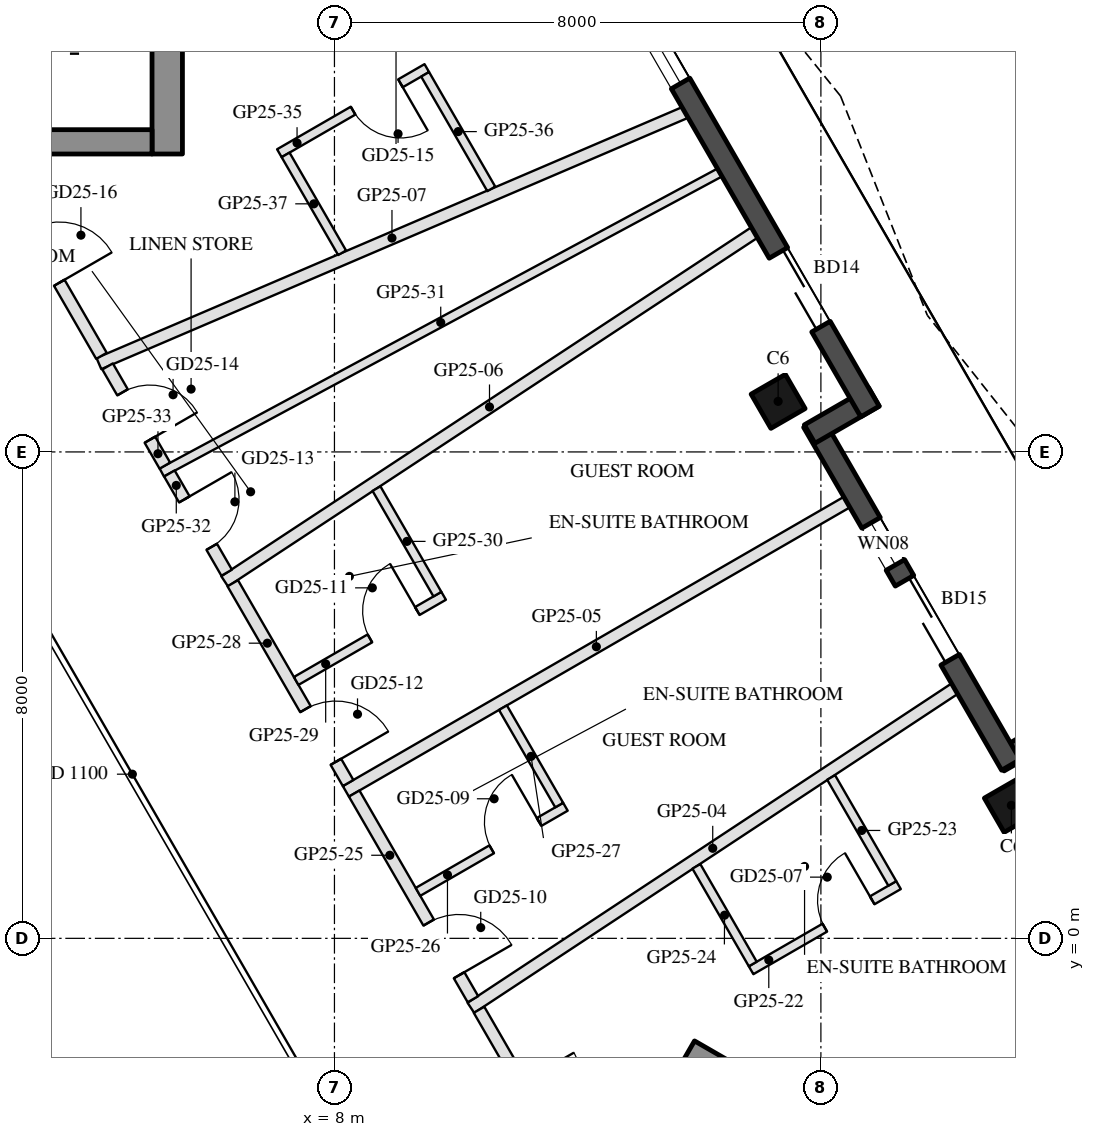
"""IFC4 building model, lengths in metres.
Left out: names, types, materials, properties, quantities, classifications, styles, units other than length and angle.
Written with IfcOpenShell. Run it as: python <this file> out.ifc"""

import sys

from ifc_helpers import new_model, si_unit, direction, frame, frame_2d, origin, origin_2d, place, context, subcontext, project, spatial, rectangle, hollow_rectangle, extrude, boolean, halfspace, element, fill, save


model = new_model("IFC4")
c1 = context("Model", 3, precision=1e-05, world=origin(), true_north=direction((0.0, 1.0)))
c2 = subcontext(c1, "Body", "Model", "MODEL_VIEW")
j1 = project(units=[si_unit("LENGTHUNIT", "METRE"), si_unit("PLANEANGLEUNIT", "RADIAN")], contexts=[c1])
p1 = place(None, origin())
s1 = spatial("IfcSite", under=j1, at=p1, CompositionType="ELEMENT")
p2 = place(p1, origin())
s2 = spatial("IfcBuilding", under=s1, at=p2, CompositionType="ELEMENT")
p3 = place(p2, frame((0.0, 0.0, 257.8)))
s3 = spatial("IfcBuildingStorey", under=s2, at=p3, CompositionType="ELEMENT", Elevation=257.8)
p4 = place(p3, frame((19.132, 2.188, 0.0), z_axis=(0.0, 0.0, 1.0), x_axis=(-0.5, 0.866025403784, 0.0)))
e1 = element("IfcColumn", 1, at=p4, inside=s3, PredefinedType="COLUMN", context=c2, shape_type="SweptSolid", body=[
    boolean("DIFFERENCE", extrude(hollow_rectangle(XDim=0.65, YDim=0.65, WallThickness=0.03, at=origin_2d()), origin(), (0.0, 0.0, 1.0), 3.7), halfspace(frame((0.0, 0.0, 0.04), z_axis=(0.0, 0.0, 1.0), x_axis=(1.0, 0.0, 0.0)), True)),
])
p5 = place(p3, frame((15.296, 8.832, 0.0), z_axis=(0.0, 0.0, 1.0), x_axis=(-0.5, 0.866025403784, 0.0)))
e2 = element("IfcColumn", 2, at=p5, inside=s3, PredefinedType="COLUMN", context=c2, shape_type="SweptSolid", body=[
    boolean("DIFFERENCE", extrude(hollow_rectangle(XDim=0.65, YDim=0.65, WallThickness=0.03, at=origin_2d()), origin(), (0.0, 0.0, 1.0), 3.7), halfspace(frame((0.0, 0.0, 0.037), z_axis=(0.0, 0.0, 1.0), x_axis=(1.0, 0.0, 0.0)), True)),
])
p6 = place(p3, frame((19.982, 3.515, 0.0), z_axis=(0.0, 0.0, 1.0), x_axis=(-0.866092288191, -0.499884134912, 0.0)))
e3 = element("IfcWall", 3, at=p6, inside=s3, PredefinedType="SOLIDWALL", context=c2, shape_type="SweptSolid", body=[
    extrude(rectangle(XDim=1.22, YDim=0.35, at=frame_2d((0.61, 0.0))), origin(), (0.0, 0.0, 1.0), 3.55),
])
p7 = place(p3, frame((19.124, 2.852, 0.0), z_axis=(0.0, 0.0, 1.0), x_axis=(-0.499993986225, 0.866028875811, 0.0)))
e4 = element("IfcWall", 4, at=p7, inside=s3, PredefinedType="SOLIDWALL", context=c2, shape_type="SweptSolid", body=[
    extrude(rectangle(XDim=6.512, YDim=0.35, at=frame_2d((3.256, 0.0))), origin(), (0.0, 0.0, 1.0), 3.55),
])
p8 = place(p7, frame((1.997, 0.0, 0.0)))
e5 = element("IfcOpeningElement", 5, at=p8, cuts=e4, PredefinedType="OPENING", context=c2, shape_type="SweptSolid", body=[
    extrude(rectangle(XDim=1.5, YDim=2.4, at=frame_2d((0.75, 1.2))), frame((0.0, 0.185, 0.0), z_axis=(0.0, -1.0, 0.0), x_axis=(1.0, 0.0, 0.0)), (0.0, 0.0, 1.0), 0.37),
])
p9 = place(p7, frame((3.797, 0.0, 0.3)))
e6 = element("IfcOpeningElement", 6, at=p9, cuts=e4, PredefinedType="OPENING", context=c2, shape_type="SweptSolid", body=[
    extrude(rectangle(XDim=0.8, YDim=2.65, at=frame_2d((0.4, 1.325))), frame((0.0, 0.185, 0.0), z_axis=(0.0, -1.0, 0.0), x_axis=(1.0, 0.0, 0.0)), (0.0, 0.0, 1.0), 0.37),
])
p10 = place(p3, frame((15.815, 8.294, 0.0), z_axis=(0.0, 0.0, 1.0), x_axis=(0.866055662726, 0.499947586314, 0.0)))
e7 = element("IfcWall", 7, at=p10, inside=s3, PredefinedType="SOLIDWALL", context=c2, shape_type="SweptSolid", body=[
    extrude(rectangle(XDim=1.22, YDim=0.35, at=frame_2d((0.61, 0.0))), origin(), (0.0, 0.0, 1.0), 3.55),
])
p11 = place(p3, frame((16.807, 8.665, 0.0), z_axis=(0.0, 0.0, 1.0), x_axis=(-0.499992427901, 0.866029775494, 0.0)))
e8 = element("IfcWall", 8, at=p11, inside=s3, PredefinedType="SOLIDWALL", context=c2, shape_type="SweptSolid", body=[
    extrude(rectangle(XDim=9.472, YDim=0.35, at=frame_2d((4.736, 0.0))), origin(), (0.0, 0.0, 1.0), 3.55),
])
p12 = place(p11, frame((1.612, 0.0, 0.0)))
e9 = element("IfcOpeningElement", 9, at=p12, cuts=e8, PredefinedType="OPENING", context=c2, shape_type="SweptSolid", body=[
    extrude(rectangle(XDim=1.4, YDim=2.4, at=frame_2d((0.7, 1.2))), frame((0.0, 0.185, 0.0), z_axis=(0.0, -1.0, 0.0), x_axis=(1.0, 0.0, 0.0)), (0.0, 0.0, 1.0), 0.37),
])
p13 = place(p11, frame((6.23, 0.0, 0.3)))
e10 = element("IfcOpeningElement", 10, at=p13, cuts=e8, PredefinedType="OPENING", context=c2, shape_type="SweptSolid", body=[
    extrude(rectangle(XDim=1.6, YDim=2.65, at=frame_2d((0.8, 1.325))), frame((0.0, 0.185, 0.0), z_axis=(0.0, -1.0, 0.0), x_axis=(1.0, 0.0, 0.0)), (0.0, 0.0, 1.0), 0.37),
])
p14 = place(p3, frame((5.25, 12.9, 0.0), z_axis=(0.0, 0.0, 1.0), x_axis=(0.0, 1.0, 0.0)))
e11 = element("IfcWall", 11, at=p14, inside=s3, PredefinedType="SHEAR", context=c2, shape_type="SweptSolid", body=[
    extrude(rectangle(XDim=13.934, YDim=0.5, at=frame_2d((6.967, 0.0))), origin(), (0.0, 0.0, 1.0), 3.5),
])
p15 = place(p3, frame((5.0, 13.1, 0.0), z_axis=(0.0, 0.0, 1.0), x_axis=(-1.0, 0.0, 0.0)))
e12 = element("IfcWall", 12, at=p15, inside=s3, PredefinedType="SHEAR", context=c2, shape_type="SweptSolid", body=[
    extrude(rectangle(XDim=10.0, YDim=0.4, at=frame_2d((5.0, 0.0))), origin(), (0.0, 0.0, 1.0), 3.5),
])
p16 = place(p15, frame((3.55, 0.0, 0.0)))
e13 = element("IfcOpeningElement", 13, at=p16, cuts=e12, PredefinedType="OPENING", context=c2, shape_type="SweptSolid", body=[
    extrude(rectangle(XDim=1.1, YDim=2.1, at=frame_2d((0.55, 1.05))), frame((0.0, 0.21, 0.0), z_axis=(0.0, -1.0, 0.0), x_axis=(1.0, 0.0, 0.0)), (0.0, 0.0, 1.0), 0.42),
])
p17 = place(p15, frame((5.85, 0.0, 0.0)))
e14 = element("IfcOpeningElement", 14, at=p17, cuts=e12, PredefinedType="OPENING", context=c2, shape_type="SweptSolid", body=[
    extrude(rectangle(XDim=1.4, YDim=2.1, at=frame_2d((0.7, 1.05))), frame((0.0, 0.21, 0.0), z_axis=(0.0, -1.0, 0.0), x_axis=(1.0, 0.0, 0.0)), (0.0, 0.0, 1.0), 0.42),
])
p18 = place(p3, frame((13.797, -1.903, 0.0), z_axis=(0.0, 0.0, 1.0), x_axis=(0.86602744543, -0.49999646375, 0.0)))
e15 = element("IfcWall", 15, at=p18, inside=s3, PredefinedType="SHEAR", context=c2, shape_type="SweptSolid", body=[
    extrude(rectangle(XDim=13.934, YDim=0.5, at=frame_2d((6.967, 0.0))), origin(), (0.0, 0.0, 1.0), 3.5),
])
p19 = place(p3, frame((18.198, 4.105, 0.0), z_axis=(0.0, 0.0, 1.0), x_axis=(-0.83467370746, -0.550744770356, 0.0)))
e16 = element("IfcWall", 16, at=p19, inside=s3, PredefinedType="PARTITIONING", context=c2, shape_type="SweptSolid", body=[
    extrude(rectangle(XDim=9.53, YDim=0.2, at=frame_2d((4.765, 0.0))), origin(), (0.0, 0.0, 1.0), 3.16),
])
p20 = place(p3, frame((16.427, 7.174, 0.0), z_axis=(0.0, 0.0, 1.0), x_axis=(-0.866033014143, -0.499986818241, 0.0)))
e17 = element("IfcWall", 17, at=p20, inside=s3, PredefinedType="PARTITIONING", context=c2, shape_type="SweptSolid", body=[
    extrude(rectangle(XDim=9.513, YDim=0.2, at=frame_2d((4.756, 0.0))), origin(), (0.0, 0.0, 1.0), 3.16),
])
p21 = place(p3, frame((14.906, 11.608, 0.0), z_axis=(0.0, 0.0, 1.0), x_axis=(-0.835212554653, -0.549927257507, 0.0)))
e18 = element("IfcWall", 18, at=p21, inside=s3, PredefinedType="PARTITIONING", context=c2, shape_type="SweptSolid", body=[
    extrude(rectangle(XDim=10.431, YDim=0.2, at=frame_2d((5.216, 0.0))), origin(), (0.0, 0.0, 1.0), 3.16),
])
p22 = place(p3, frame((13.766, 13.583, 0.0), z_axis=(0.0, 0.0, 1.0), x_axis=(-0.919210042537, -0.393767568115, 0.0)))
e19 = element("IfcWall", 19, at=p22, inside=s3, PredefinedType="PARTITIONING", context=c2, shape_type="SweptSolid", body=[
    extrude(rectangle(XDim=10.487, YDim=0.2, at=frame_2d((5.243, 0.0))), origin(), (0.0, 0.0, 1.0), 3.16),
])
p23 = place(p3, frame((10.378, -1.175, 0.0), z_axis=(0.0, 0.0, 1.0), x_axis=(0.50004096614, -0.86600175068, 0.0)))
e20 = element("IfcWall", 20, at=p23, inside=s3, PredefinedType="PARTITIONING", context=c2, shape_type="SweptSolid", body=[
    extrude(rectangle(XDim=3.782, YDim=0.2, at=frame_2d((1.891, 0.0))), origin(), (0.0, 0.0, 1.0), 3.0),
])
p24 = place(p23, frame((1.391, 0.0, 0.0)))
e21 = element("IfcOpeningElement", 21, at=p24, cuts=e20, PredefinedType="OPENING", context=c2, shape_type="SweptSolid", body=[
    extrude(rectangle(XDim=1.0, YDim=2.1, at=frame_2d((0.5, 1.05))), frame((0.0, 0.11, 0.0), z_axis=(0.0, -1.0, 0.0), x_axis=(1.0, 0.0, 0.0)), (0.0, 0.0, 1.0), 0.22),
])
p25 = place(p3, frame((14.852, -0.524, 0.0), z_axis=(0.0, 0.0, 1.0), x_axis=(0.866034573852, 0.49998411664, 0.0)))
e22 = element("IfcWall", 22, at=p25, inside=s3, PredefinedType="PARTITIONING", context=c2, shape_type="SweptSolid", body=[
    extrude(rectangle(XDim=2.8, YDim=0.15, at=frame_2d((1.4, 0.0))), origin(), (0.0, 0.0, 1.0), 3.55),
])
p26 = place(p25, frame((1.4, 0.0, 0.0)))
e23 = element("IfcOpeningElement", 23, at=p26, cuts=e22, PredefinedType="OPENING", context=c2, shape_type="SweptSolid", body=[
    extrude(rectangle(XDim=0.9, YDim=2.1, at=frame_2d((0.45, 1.05))), frame((0.0, 0.085, 0.0), z_axis=(0.0, -1.0, 0.0), x_axis=(1.0, 0.0, 0.0)), (0.0, 0.0, 1.0), 0.17),
])
p27 = place(p3, frame((17.175, 0.903, 0.0), z_axis=(0.0, 0.0, 1.0), x_axis=(-0.499974444137, 0.866040157966, 0.0)))
e24 = element("IfcWall", 24, at=p27, inside=s3, PredefinedType="PARTITIONING", context=c2, shape_type="SweptSolid", body=[
    extrude(rectangle(XDim=2.013, YDim=0.15, at=frame_2d((1.006, 0.0))), origin(), (0.0, 0.0, 1.0), 3.0),
])
p28 = place(p3, frame((14.879, -0.422, 0.0), z_axis=(0.0, 0.0, 1.0), x_axis=(-0.499920006315, 0.866071583234, 0.0)))
e25 = element("IfcWall", 25, at=p28, inside=s3, PredefinedType="PARTITIONING", context=c2, shape_type="SweptSolid", body=[
    extrude(rectangle(XDim=1.854, YDim=0.15, at=frame_2d((0.927, 0.0))), origin(), (0.0, 0.0, 1.0), 3.0),
])
p29 = place(p3, frame((8.325, 2.381, 0.0), z_axis=(0.0, 0.0, 1.0), x_axis=(0.499991187483, -0.866030491634, 0.0)))
e26 = element("IfcWall", 26, at=p29, inside=s3, PredefinedType="PARTITIONING", context=c2, shape_type="SweptSolid", body=[
    extrude(rectangle(XDim=3.906, YDim=0.2, at=frame_2d((1.953, 0.0))), origin(), (0.0, 0.0, 1.0), 3.0),
])
p30 = place(p29, frame((2.45, 0.0, 0.0)))
e27 = element("IfcOpeningElement", 27, at=p30, cuts=e26, PredefinedType="OPENING", context=c2, shape_type="SweptSolid", body=[
    extrude(rectangle(XDim=1.0, YDim=2.1, at=frame_2d((0.5, 1.05))), frame((0.0, 0.11, 0.0), z_axis=(0.0, -1.0, 0.0), x_axis=(1.0, 0.0, 0.0)), (0.0, 0.0, 1.0), 0.22),
])
p31 = place(p3, frame((9.374, 0.764, 0.0), z_axis=(0.0, 0.0, 1.0), x_axis=(0.865996816683, 0.500049511043, 0.0)))
e28 = element("IfcWall", 28, at=p31, inside=s3, PredefinedType="PARTITIONING", context=c2, shape_type="SweptSolid", body=[
    extrude(rectangle(XDim=2.8, YDim=0.15, at=frame_2d((1.4, 0.0))), origin(), (0.0, 0.0, 1.0), 3.55),
])
p32 = place(p31, frame((1.4, 0.0, 0.0)))
e29 = element("IfcOpeningElement", 29, at=p32, cuts=e28, PredefinedType="OPENING", context=c2, shape_type="SweptSolid", body=[
    extrude(rectangle(XDim=0.9, YDim=2.1, at=frame_2d((0.45, 1.05))), frame((0.0, 0.085, 0.0), z_axis=(0.0, -1.0, 0.0), x_axis=(1.0, 0.0, 0.0)), (0.0, 0.0, 1.0), 0.17),
])
p33 = place(p3, frame((11.696, 2.192, 0.0), z_axis=(0.0, 0.0, 1.0), x_axis=(-0.500042316284, 0.866000971088, 0.0)))
e30 = element("IfcWall", 30, at=p33, inside=s3, PredefinedType="PARTITIONING", context=c2, shape_type="SweptSolid", body=[
    extrude(rectangle(XDim=1.85, YDim=0.15, at=frame_2d((0.925, 0.0))), origin(), (0.0, 0.0, 1.0), 3.0),
])
p34 = place(p3, frame((6.328, 5.84, 0.0), z_axis=(0.0, 0.0, 1.0), x_axis=(0.50002883476, -0.866008755388, 0.0)))
e31 = element("IfcWall", 31, at=p34, inside=s3, PredefinedType="PARTITIONING", context=c2, shape_type="SweptSolid", body=[
    extrude(rectangle(XDim=3.794, YDim=0.2, at=frame_2d((1.897, 0.0))), origin(), (0.0, 0.0, 1.0), 3.0),
])
p35 = place(p34, frame((2.391, 0.0, 0.0)))
e32 = element("IfcOpeningElement", 32, at=p35, cuts=e31, PredefinedType="OPENING", context=c2, shape_type="SweptSolid", body=[
    extrude(rectangle(XDim=1.0, YDim=2.1, at=frame_2d((0.5, 1.05))), frame((0.0, 0.11, 0.0), z_axis=(0.0, -1.0, 0.0), x_axis=(1.0, 0.0, 0.0)), (0.0, 0.0, 1.0), 0.22),
])
p36 = place(p3, frame((7.371, 4.233, 0.0), z_axis=(0.0, 0.0, 1.0), x_axis=(0.866034573852, 0.49998411664, 0.0)))
e33 = element("IfcWall", 33, at=p36, inside=s3, PredefinedType="PARTITIONING", context=c2, shape_type="SweptSolid", body=[
    extrude(rectangle(XDim=2.8, YDim=0.15, at=frame_2d((1.4, 0.0))), origin(), (0.0, 0.0, 1.0), 3.0),
])
p37 = place(p36, frame((1.4, 0.0, 0.0)))
e34 = element("IfcOpeningElement", 34, at=p37, cuts=e33, PredefinedType="OPENING", context=c2, shape_type="SweptSolid", body=[
    extrude(rectangle(XDim=0.9, YDim=2.1, at=frame_2d((0.45, 1.05))), frame((0.0, 0.085, 0.0), z_axis=(0.0, -1.0, 0.0), x_axis=(1.0, 0.0, 0.0)), (0.0, 0.0, 1.0), 0.17),
])
p38 = place(p3, frame((9.693, 5.661, 0.0), z_axis=(0.0, 0.0, 1.0), x_axis=(-0.499964999879, 0.866045610171, 0.0)))
e35 = element("IfcWall", 35, at=p38, inside=s3, PredefinedType="PARTITIONING", context=c2, shape_type="SweptSolid", body=[
    extrude(rectangle(XDim=2.004, YDim=0.15, at=frame_2d((1.002, 0.0))), origin(), (0.0, 0.0, 1.0), 3.0),
])
p39 = place(p3, frame((14.336, 12.595, 0.0), z_axis=(0.0, 0.0, 1.0), x_axis=(-0.880794466183, -0.473498794445, 0.0)))
e36 = element("IfcWall", 36, at=p39, inside=s3, PredefinedType="PARTITIONING", context=c2, shape_type="SweptSolid", body=[
    extrude(rectangle(XDim=10.418, YDim=0.15, at=frame_2d((5.209, 0.0))), origin(), (0.0, 0.0, 1.0), 3.0),
])
p40 = place(p3, frame((5.286, 7.645, 0.0), z_axis=(0.0, 0.0, 1.0), x_axis=(0.500014143148, -0.86601723808, 0.0)))
e37 = element("IfcWall", 37, at=p40, inside=s3, PredefinedType="PARTITIONING", context=c2, shape_type="SweptSolid", body=[
    extrude(rectangle(XDim=1.884, YDim=0.2, at=frame_2d((0.942, 0.0))), origin(), (0.0, 0.0, 1.0), 3.0),
])
p41 = place(p40, frame((0.492, 0.0, 0.0)))
e38 = element("IfcOpeningElement", 38, at=p41, cuts=e37, PredefinedType="OPENING", context=c2, shape_type="SweptSolid", body=[
    extrude(rectangle(XDim=0.9, YDim=2.1, at=frame_2d((0.45, 1.05))), frame((0.0, 0.11, 0.0), z_axis=(0.0, -1.0, 0.0), x_axis=(1.0, 0.0, 0.0)), (0.0, 0.0, 1.0), 0.22),
])
p42 = place(p3, frame((4.269, 9.406, 0.0), z_axis=(0.0, 0.0, 1.0), x_axis=(0.499973055223, -0.8660409598, 0.0)))
e39 = element("IfcWall", 39, at=p42, inside=s3, PredefinedType="PARTITIONING", context=c2, shape_type="SweptSolid", body=[
    extrude(rectangle(XDim=1.883, YDim=0.2, at=frame_2d((0.942, 0.0))), origin(), (0.0, 0.0, 1.0), 3.55),
])
p43 = place(p42, frame((0.492, 0.0, 0.0)))
e40 = element("IfcOpeningElement", 40, at=p43, cuts=e39, PredefinedType="OPENING", context=c2, shape_type="SweptSolid", body=[
    extrude(rectangle(XDim=0.9, YDim=2.1, at=frame_2d((0.45, 1.05))), frame((0.0, 0.11, 0.0), z_axis=(0.0, -1.0, 0.0), x_axis=(1.0, 0.0, 0.0)), (0.0, 0.0, 1.0), 0.22),
])
p44 = place(p3, frame((2.281, 12.85, 0.0), z_axis=(0.0, 0.0, 1.0), x_axis=(0.499978071388, -0.866038063904, 0.0)))
e41 = element("IfcWall", 41, at=p44, inside=s3, PredefinedType="PARTITIONING", context=c2, shape_type="SweptSolid", body=[
    extrude(rectangle(XDim=3.776, YDim=0.2, at=frame_2d((1.888, 0.0))), origin(), (0.0, 0.0, 1.0), 3.0),
])
p45 = place(p44, frame((1.388, 0.0, 0.0)))
e42 = element("IfcOpeningElement", 42, at=p45, cuts=e41, PredefinedType="OPENING", context=c2, shape_type="SweptSolid", body=[
    extrude(rectangle(XDim=1.0, YDim=2.1, at=frame_2d((0.5, 1.05))), frame((0.0, 0.11, 0.0), z_axis=(0.0, -1.0, 0.0), x_axis=(1.0, 0.0, 0.0)), (0.0, 0.0, 1.0), 0.22),
])
p46 = place(p3, frame((9.519, 14.313, 0.0), z_axis=(0.0, 0.0, 1.0), x_axis=(-0.865996816683, -0.500049511043, 0.0)))
e43 = element("IfcWall", 43, at=p46, inside=s3, PredefinedType="PARTITIONING", context=c2, shape_type="SweptSolid", body=[
    extrude(rectangle(XDim=2.8, YDim=0.15, at=frame_2d((1.4, 0.0))), origin(), (0.0, 0.0, 1.0), 3.0),
])
p47 = place(p46, frame((0.5, 0.0, 0.0)))
e44 = element("IfcOpeningElement", 44, at=p47, cuts=e43, PredefinedType="OPENING", context=c2, shape_type="SweptSolid", body=[
    extrude(rectangle(XDim=0.9, YDim=2.1, at=frame_2d((0.45, 1.05))), frame((0.0, 0.085, 0.0), z_axis=(0.0, -1.0, 0.0), x_axis=(1.0, 0.0, 0.0)), (0.0, 0.0, 1.0), 0.17),
])
p48 = place(p3, frame((10.579, 12.326, 0.0), z_axis=(0.0, 0.0, 1.0), x_axis=(-0.499965319569, 0.866045425615, 0.0)))
e45 = element("IfcWall", 45, at=p48, inside=s3, PredefinedType="PARTITIONING", context=c2, shape_type="SweptSolid", body=[
    extrude(rectangle(XDim=2.176, YDim=0.15, at=frame_2d((1.088, 0.0))), origin(), (0.0, 0.0, 1.0), 3.55),
])
p49 = place(p3, frame((8.126, 11.276, 0.0), z_axis=(0.0, 0.0, 1.0), x_axis=(-0.500093796661, 0.865971243484, 0.0)))
e46 = element("IfcWall", 46, at=p49, inside=s3, PredefinedType="PARTITIONING", context=c2, shape_type="SweptSolid", body=[
    extrude(rectangle(XDim=1.859, YDim=0.15, at=frame_2d((0.93, 0.0))), origin(), (0.0, 0.0, 1.0), 3.55),
])
p50 = place(p8, frame((1.5, 0.0, 0.0), z_axis=(0.0, 0.0, 1.0), x_axis=(-1.0, 0.0, 0.0)))
e47 = element("IfcDoor", 47, at=p50, inside=s3, OperationType="SLIDING_TO_LEFT", PredefinedType="DOOR", context=c2, shape_type="SweptSolid", body=[
    extrude(rectangle(XDim=1.5, YDim=2.4, at=frame_2d((0.75, 1.2))), frame((0.0, 0.025, 0.0), z_axis=(0.0, -1.0, 0.0), x_axis=(1.0, 0.0, 0.0)), (0.0, 0.0, 1.0), 0.05),
])
fill(e5, e47)
p51 = place(p9, origin())
e48 = element("IfcWindow", 48, at=p51, inside=s3, PartitioningType="SINGLE_PANEL", PredefinedType="WINDOW", context=c2, shape_type="SweptSolid", body=[
    extrude(rectangle(XDim=0.8, YDim=2.65, at=frame_2d((0.4, 1.325))), frame((0.0, 0.03, 0.0), z_axis=(0.0, -1.0, 0.0), x_axis=(1.0, 0.0, 0.0)), (0.0, 0.0, 1.0), 0.06),
])
fill(e6, e48)
p52 = place(p12, frame((1.4, 0.0, 0.0), z_axis=(0.0, 0.0, 1.0), x_axis=(-1.0, 0.0, 0.0)))
e49 = element("IfcDoor", 49, at=p52, inside=s3, OperationType="SLIDING_TO_LEFT", PredefinedType="DOOR", context=c2, shape_type="SweptSolid", body=[
    extrude(rectangle(XDim=1.4, YDim=2.4, at=frame_2d((0.7, 1.2))), frame((0.0, 0.025, 0.0), z_axis=(0.0, -1.0, 0.0), x_axis=(1.0, 0.0, 0.0)), (0.0, 0.0, 1.0), 0.05),
])
fill(e9, e49)
p53 = place(p13, origin())
e50 = element("IfcWindow", 50, at=p53, inside=s3, PartitioningType="SINGLE_PANEL", PredefinedType="WINDOW", context=c2, shape_type="SweptSolid", body=[
    extrude(rectangle(XDim=1.6, YDim=2.65, at=frame_2d((0.8, 1.325))), frame((0.0, 0.03, 0.0), z_axis=(0.0, -1.0, 0.0), x_axis=(1.0, 0.0, 0.0)), (0.0, 0.0, 1.0), 0.06),
])
fill(e10, e50)
p54 = place(p26, origin())
e51 = element("IfcDoor", 51, at=p54, inside=s3, OperationType="SINGLE_SWING_RIGHT", PredefinedType="DOOR", context=c2, shape_type="SweptSolid", body=[
    extrude(rectangle(XDim=0.9, YDim=2.1, at=frame_2d((0.45, 1.05))), frame((0.0, 0.025, 0.0), z_axis=(0.0, -1.0, 0.0), x_axis=(1.0, 0.0, 0.0)), (0.0, 0.0, 1.0), 0.05),
])
fill(e23, e51)
p55 = place(p32, origin())
e52 = element("IfcDoor", 52, at=p55, inside=s3, OperationType="SINGLE_SWING_RIGHT", PredefinedType="DOOR", context=c2, shape_type="SweptSolid", body=[
    extrude(rectangle(XDim=0.9, YDim=2.1, at=frame_2d((0.45, 1.05))), frame((0.0, 0.025, 0.0), z_axis=(0.0, -1.0, 0.0), x_axis=(1.0, 0.0, 0.0)), (0.0, 0.0, 1.0), 0.05),
])
fill(e29, e52)
p56 = place(p30, origin())
e53 = element("IfcDoor", 53, at=p56, inside=s3, OperationType="SINGLE_SWING_RIGHT", PredefinedType="DOOR", context=c2, shape_type="SweptSolid", body=[
    extrude(rectangle(XDim=1.0, YDim=2.1, at=frame_2d((0.5, 1.05))), frame((0.0, 0.025, 0.0), z_axis=(0.0, -1.0, 0.0), x_axis=(1.0, 0.0, 0.0)), (0.0, 0.0, 1.0), 0.05),
])
fill(e27, e53)
p57 = place(p37, origin())
e54 = element("IfcDoor", 54, at=p57, inside=s3, OperationType="SINGLE_SWING_RIGHT", PredefinedType="DOOR", context=c2, shape_type="SweptSolid", body=[
    extrude(rectangle(XDim=0.9, YDim=2.1, at=frame_2d((0.45, 1.05))), frame((0.0, 0.025, 0.0), z_axis=(0.0, -1.0, 0.0), x_axis=(1.0, 0.0, 0.0)), (0.0, 0.0, 1.0), 0.05),
])
fill(e34, e54)
p58 = place(p35, origin())
e55 = element("IfcDoor", 55, at=p58, inside=s3, OperationType="SINGLE_SWING_RIGHT", PredefinedType="DOOR", context=c2, shape_type="SweptSolid", body=[
    extrude(rectangle(XDim=1.0, YDim=2.1, at=frame_2d((0.5, 1.05))), frame((0.0, 0.025, 0.0), z_axis=(0.0, -1.0, 0.0), x_axis=(1.0, 0.0, 0.0)), (0.0, 0.0, 1.0), 0.05),
])
fill(e32, e55)
p59 = place(p41, origin())
e56 = element("IfcDoor", 56, at=p59, inside=s3, OperationType="SINGLE_SWING_LEFT", PredefinedType="DOOR", context=c2, shape_type="SweptSolid", body=[
    extrude(rectangle(XDim=0.9, YDim=2.1, at=frame_2d((0.45, 1.05))), frame((0.0, 0.025, 0.0), z_axis=(0.0, -1.0, 0.0), x_axis=(1.0, 0.0, 0.0)), (0.0, 0.0, 1.0), 0.05),
])
fill(e38, e56)
p60 = place(p43, origin())
e57 = element("IfcDoor", 57, at=p60, inside=s3, OperationType="SINGLE_SWING_RIGHT", PredefinedType="DOOR", context=c2, shape_type="SweptSolid", body=[
    extrude(rectangle(XDim=0.9, YDim=2.1, at=frame_2d((0.45, 1.05))), frame((0.0, 0.025, 0.0), z_axis=(0.0, -1.0, 0.0), x_axis=(1.0, 0.0, 0.0)), (0.0, 0.0, 1.0), 0.05),
])
fill(e40, e57)
p61 = place(p47, origin())
e58 = element("IfcDoor", 58, at=p61, inside=s3, OperationType="SINGLE_SWING_LEFT", PredefinedType="DOOR", context=c2, shape_type="SweptSolid", body=[
    extrude(rectangle(XDim=0.9, YDim=2.1, at=frame_2d((0.45, 1.05))), frame((0.0, 0.025, 0.0), z_axis=(0.0, -1.0, 0.0), x_axis=(1.0, 0.0, 0.0)), (0.0, 0.0, 1.0), 0.05),
])
fill(e44, e58)
p62 = place(p45, origin())
e59 = element("IfcDoor", 59, at=p62, inside=s3, OperationType="SINGLE_SWING_RIGHT", PredefinedType="DOOR", context=c2, shape_type="SweptSolid", body=[
    extrude(rectangle(XDim=1.0, YDim=2.1, at=frame_2d((0.5, 1.05))), frame((0.0, 0.025, 0.0), z_axis=(0.0, -1.0, 0.0), x_axis=(1.0, 0.0, 0.0)), (0.0, 0.0, 1.0), 0.05),
])
fill(e42, e59)
save(model, sys.argv[1])
